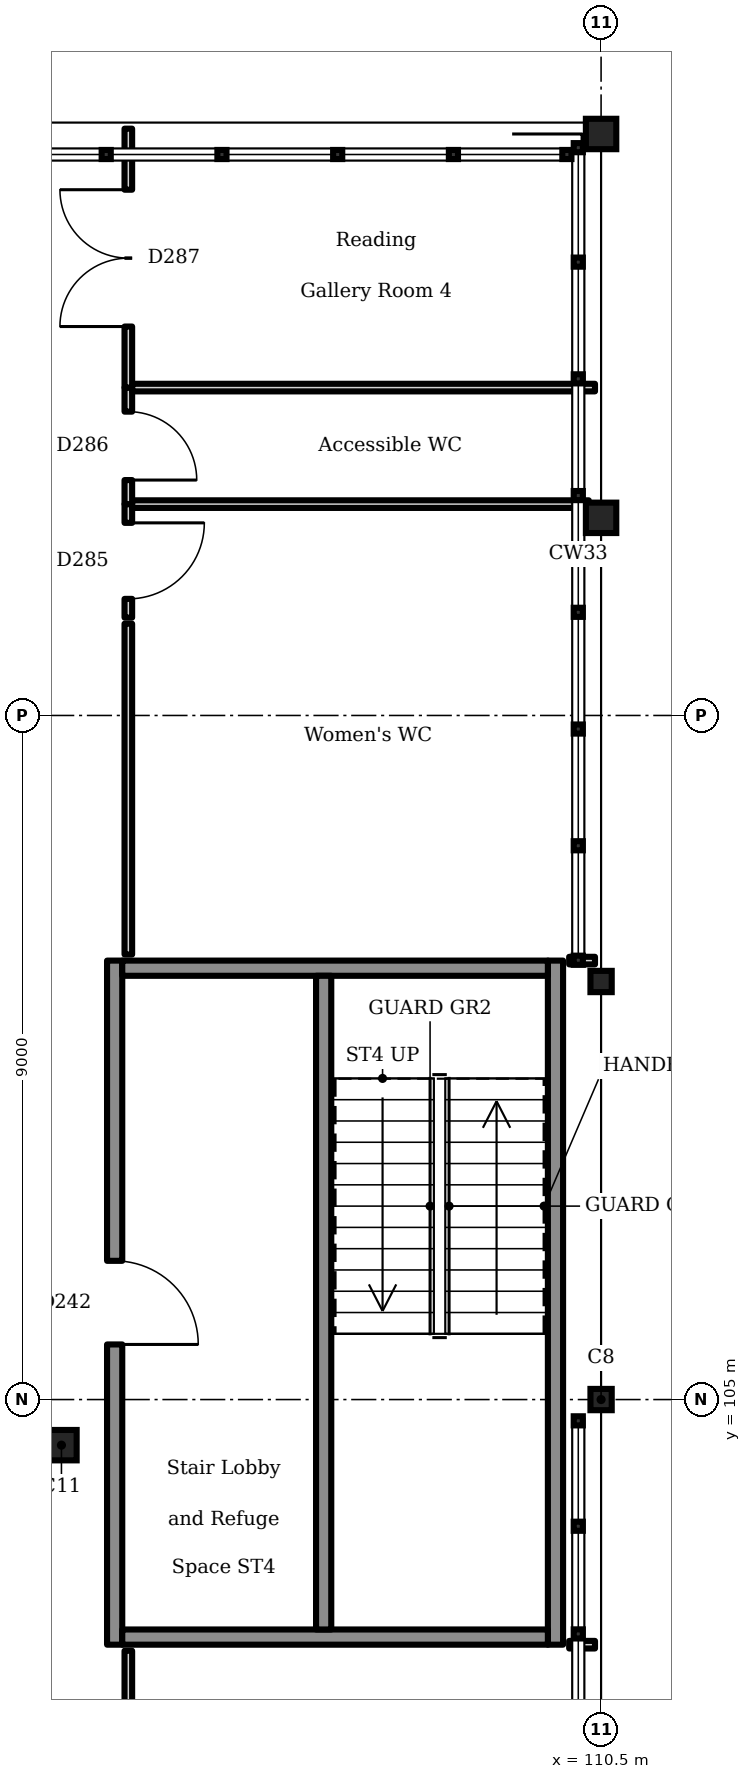
"""IFC4 building model, lengths in metres.
Left out: names, types, materials, properties, quantities, classifications, styles, units other than length and angle.
Written with IfcOpenShell. Run it as: python <this file> out.ifc"""

import sys

from ifc_helpers import new_model, si_unit, direction, frame, frame_2d, origin, origin_2d, place, context, subcontext, project, spatial, rectangle, hollow_circle, i_section, extrude, element, fill, save


model = new_model("IFC4")
c1 = context("Model", 3, precision=1e-05, world=origin(), true_north=direction((0.0, 1.0)))
c2 = subcontext(c1, "Body", "Model", "MODEL_VIEW")
j1 = project(units=[si_unit("LENGTHUNIT", "METRE"), si_unit("PLANEANGLEUNIT", "RADIAN")], contexts=[c1])
p1 = place(None, origin())
s1 = spatial("IfcSite", under=j1, at=p1, CompositionType="ELEMENT")
p2 = place(p1, origin())
s2 = spatial("IfcBuilding", under=s1, at=p2, CompositionType="ELEMENT")
p3 = place(p2, frame((0.0, 0.0, 18.9)))
s3 = spatial("IfcBuildingStorey", under=s2, at=p3, CompositionType="ELEMENT", Elevation=18.9)
for number, where, z_axis, x_axis in (
    (1, (110.5, 105.0, 0.0), (0.0, 0.0, 1.0), (1.0, 0.0, 0.0)),
    (2, (110.5, 110.5, 0.0), (0.0, 0.0, 1.0), (1.0, 0.0, 0.0)),
):
    element("IfcColumn", number, at=place(p3, frame(where, z_axis=z_axis, x_axis=x_axis)), inside=s3, PredefinedType="COLUMN", context=c2, shape_type="SweptSolid", body=[
        extrude(i_section(OverallWidth=0.28, OverallDepth=0.28, WebThickness=0.01, FlangeThickness=0.018, FilletRadius=0.024, at=origin_2d()), origin(), (0.0, 0.0, 1.0), 4.5),
    ])
p4 = place(p3, frame((103.4, 104.4, 0.0), z_axis=(0.0, 0.0, 1.0), x_axis=(1.0, 0.0, 0.0)))
e3 = element("IfcColumn", 3, at=p4, inside=s3, PredefinedType="COLUMN", context=c2, shape_type="SweptSolid", body=[
    extrude(hollow_circle(Radius=0.203, WallThickness=0.012, at=origin_2d()), origin(), (0.0, 0.0, 1.0), 4.5),
])
for number, where, z_axis, x_axis in (
    (4, (110.5, 121.65, 0.0), (0.0, 0.0, 1.0), (1.0, 0.0, 0.0)),
    (5, (110.5, 116.6, 0.0), (0.0, 0.0, 1.0), (1.0, 0.0, 0.0)),
):
    element("IfcColumn", number, at=place(p3, frame(where, z_axis=z_axis, x_axis=x_axis)), inside=s3, PredefinedType="COLUMN", context=c2, shape_type="SweptSolid", body=[
        extrude(hollow_circle(Radius=0.162, WallThickness=0.012, at=origin_2d()), origin(), (0.0, 0.0, 1.0), 4.5),
    ])
p5 = place(p3, frame((104.1, 101.775, 0.0), z_axis=(0.0, 0.0, 1.0), x_axis=(0.0, 1.0, 0.0)))
e6 = element("IfcWall", 6, at=p5, inside=s3, PredefinedType="SOLIDWALL", context=c2, shape_type="SweptSolid", body=[
    extrude(rectangle(XDim=9.0, YDim=0.2, at=frame_2d((4.5, 0.0))), origin(), (0.0, 0.0, 1.0), 4.35),
])
p6 = place(p5, frame((3.95, 0.0, 0.0)))
e7 = element("IfcOpeningElement", 7, at=p6, cuts=e6, PredefinedType="OPENING", context=c2, shape_type="SweptSolid", body=[
    extrude(rectangle(XDim=1.1, YDim=2.1, at=frame_2d((0.55, 1.05))), frame((0.0, 0.11, 0.0), z_axis=(0.0, -1.0, 0.0), x_axis=(1.0, 0.0, 0.0)), (0.0, 0.0, 1.0), 0.22),
])
p7 = place(p3, frame((109.9, 101.775, 0.0), z_axis=(0.0, 0.0, 1.0), x_axis=(0.0, 1.0, 0.0)))
e8 = element("IfcWall", 8, at=p7, inside=s3, PredefinedType="SOLIDWALL", context=c2, shape_type="SweptSolid", body=[
    extrude(rectangle(XDim=9.0, YDim=0.2, at=frame_2d((4.5, 0.0))), origin(), (0.0, 0.0, 1.0), 4.35),
])
for number, where, z_axis, x_axis in (
    (9, (104.2, 101.875, 0.0), (0.0, 0.0, 1.0), (1.0, 0.0, 0.0)),
    (10, (104.2, 110.675, 0.0), (0.0, 0.0, 1.0), (1.0, 0.0, 0.0)),
):
    element("IfcWall", number, at=place(p3, frame(where, z_axis=z_axis, x_axis=x_axis)), inside=s3, PredefinedType="SOLIDWALL", context=c2, shape_type="SweptSolid", body=[
        extrude(rectangle(XDim=5.6, YDim=0.2, at=frame_2d((2.8, 0.0))), origin(), (0.0, 0.0, 1.0), 4.35),
    ])
p8 = place(p3, frame((106.85, 101.975, 0.0), z_axis=(0.0, 0.0, 1.0), x_axis=(0.0, 1.0, 0.0)))
e11 = element("IfcWall", 11, at=p8, inside=s3, PredefinedType="SOLIDWALL", context=c2, shape_type="SweptSolid", body=[
    extrude(rectangle(XDim=8.6, YDim=0.2, at=frame_2d((4.3, 0.0))), origin(), (0.0, 0.0, 1.0), 4.35),
])
p9 = place(p3, frame((104.28, 96.08, 0.0), z_axis=(0.0, 0.0, 1.0), x_axis=(0.0, 1.0, 0.0)))
e12 = element("IfcWall", 12, at=p9, inside=s3, PredefinedType="PARTITIONING", context=c2, shape_type="SweptSolid", body=[
    extrude(rectangle(XDim=5.615, YDim=0.1, at=frame_2d((2.808, 0.0))), origin(), (0.0, 0.0, 1.0), 4.35),
])
p10 = place(p9, frame((1.907, 0.0, 0.0)))
e13 = element("IfcOpeningElement", 13, at=p10, cuts=e12, PredefinedType="OPENING", context=c2, shape_type="SweptSolid", body=[
    extrude(rectangle(XDim=1.8, YDim=2.1, at=frame_2d((0.9, 1.05))), frame((0.0, 0.06, 0.0), z_axis=(0.0, -1.0, 0.0), x_axis=(1.0, 0.0, 0.0)), (0.0, 0.0, 1.0), 0.12),
])
p11 = place(p3, frame((110.08, 101.775, 0.0), z_axis=(0.0, 0.0, 1.0), x_axis=(1.0, 0.0, 0.0)))
e14 = element("IfcWall", 14, at=p11, inside=s3, PredefinedType="PARTITIONING", context=c2, shape_type="SweptSolid", body=[
    extrude(rectangle(XDim=0.34, YDim=0.1, at=frame_2d((0.17, 0.0))), origin(), (0.0, 0.0, 1.0), 3.91),
])
p12 = place(p3, frame((110.42, 110.775, 0.0), z_axis=(0.0, 0.0, 1.0), x_axis=(-1.0, 0.0, 0.0)))
e15 = element("IfcWall", 15, at=p12, inside=s3, PredefinedType="PARTITIONING", context=c2, shape_type="SweptSolid", body=[
    extrude(rectangle(XDim=0.34, YDim=0.1, at=frame_2d((0.17, 0.0))), origin(), (0.0, 0.0, 1.0), 4.04),
])
p13 = place(p3, frame((104.28, 110.855, 0.0), z_axis=(0.0, 0.0, 1.0), x_axis=(0.0, 1.0, 0.0)))
e16 = element("IfcWall", 16, at=p13, inside=s3, PredefinedType="PARTITIONING", context=c2, shape_type="SweptSolid", body=[
    extrude(rectangle(XDim=4.352, YDim=0.1, at=frame_2d((2.176, 0.0))), origin(), (0.0, 0.0, 1.0), 4.35),
])
p14 = place(p3, frame((104.28, 115.287, 0.0), z_axis=(0.0, 0.0, 1.0), x_axis=(0.0, 1.0, 0.0)))
e17 = element("IfcWall", 17, at=p14, inside=s3, PredefinedType="PARTITIONING", context=c2, shape_type="SweptSolid", body=[
    extrude(rectangle(XDim=1.493, YDim=0.1, at=frame_2d((0.747, 0.0))), origin(), (0.0, 0.0, 1.0), 4.35),
])
p15 = place(p14, frame((0.247, 0.0, 0.0)))
e18 = element("IfcOpeningElement", 18, at=p15, cuts=e17, PredefinedType="OPENING", context=c2, shape_type="SweptSolid", body=[
    extrude(rectangle(XDim=1.0, YDim=2.1, at=frame_2d((0.5, 1.05))), frame((0.0, 0.06, 0.0), z_axis=(0.0, -1.0, 0.0), x_axis=(1.0, 0.0, 0.0)), (0.0, 0.0, 1.0), 0.12),
])
p16 = place(p3, frame((104.33, 116.781, 0.0), z_axis=(0.0, 0.0, 1.0), x_axis=(1.0, 0.0, 0.0)))
e19 = element("IfcWall", 19, at=p16, inside=s3, PredefinedType="PARTITIONING", context=c2, shape_type="SweptSolid", body=[
    extrude(rectangle(XDim=6.008, YDim=0.1, at=frame_2d((3.004, 0.0))), origin(), (0.0, 0.0, 1.0), 3.85),
])
p17 = place(p3, frame((104.28, 116.781, 0.0), z_axis=(0.0, 0.0, 1.0), x_axis=(0.0, 1.0, 0.0)))
e20 = element("IfcWall", 20, at=p17, inside=s3, PredefinedType="PARTITIONING", context=c2, shape_type="SweptSolid", body=[
    extrude(rectangle(XDim=1.533, YDim=0.1, at=frame_2d((0.767, 0.0))), origin(), (0.0, 0.0, 1.0), 4.35),
])
p18 = place(p17, frame((0.317, 0.0, 0.0)))
e21 = element("IfcOpeningElement", 21, at=p18, cuts=e20, PredefinedType="OPENING", context=c2, shape_type="SweptSolid", body=[
    extrude(rectangle(XDim=0.9, YDim=2.1, at=frame_2d((0.45, 1.05))), frame((0.0, 0.06, 0.0), z_axis=(0.0, -1.0, 0.0), x_axis=(1.0, 0.0, 0.0)), (0.0, 0.0, 1.0), 0.12),
])
p19 = place(p3, frame((104.33, 118.314, 0.0), z_axis=(0.0, 0.0, 1.0), x_axis=(1.0, 0.0, 0.0)))
e22 = element("IfcWall", 22, at=p19, inside=s3, PredefinedType="PARTITIONING", context=c2, shape_type="SweptSolid", body=[
    extrude(rectangle(XDim=6.09, YDim=0.1, at=frame_2d((3.045, 0.0))), origin(), (0.0, 0.0, 1.0), 3.85),
])
p20 = place(p3, frame((104.28, 118.314, 0.0), z_axis=(0.0, 0.0, 1.0), x_axis=(0.0, 1.0, 0.0)))
e23 = element("IfcWall", 23, at=p20, inside=s3, PredefinedType="PARTITIONING", context=c2, shape_type="SweptSolid", body=[
    extrude(rectangle(XDim=3.406, YDim=0.1, at=frame_2d((1.703, 0.0))), origin(), (0.0, 0.0, 1.0), 3.95),
])
p21 = place(p20, frame((0.803, 0.0, 0.0)))
e24 = element("IfcOpeningElement", 24, at=p21, cuts=e23, PredefinedType="OPENING", context=c2, shape_type="SweptSolid", body=[
    extrude(rectangle(XDim=1.8, YDim=2.1, at=frame_2d((0.9, 1.05))), frame((0.0, 0.06, 0.0), z_axis=(0.0, -1.0, 0.0), x_axis=(1.0, 0.0, 0.0)), (0.0, 0.0, 1.0), 0.12),
])
p22 = place(p6, frame((1.1, 0.0, 0.0), z_axis=(0.0, 0.0, 1.0), x_axis=(-1.0, 0.0, 0.0)))
e25 = element("IfcDoor", 25, at=p22, inside=s3, OperationType="SINGLE_SWING_LEFT", PredefinedType="DOOR", context=c2, shape_type="SweptSolid", body=[
    extrude(rectangle(XDim=1.1, YDim=2.1, at=frame_2d((0.55, 1.05))), frame((0.0, 0.025, 0.0), z_axis=(0.0, -1.0, 0.0), x_axis=(1.0, 0.0, 0.0)), (0.0, 0.0, 1.0), 0.05),
])
fill(e7, e25)
p23 = place(p15, frame((1.0, 0.0, 0.0), z_axis=(0.0, 0.0, 1.0), x_axis=(-1.0, 0.0, 0.0)))
e26 = element("IfcDoor", 26, at=p23, inside=s3, OperationType="SINGLE_SWING_RIGHT", PredefinedType="DOOR", context=c2, shape_type="SweptSolid", body=[
    extrude(rectangle(XDim=1.0, YDim=2.1, at=frame_2d((0.5, 1.05))), frame((0.0, 0.025, 0.0), z_axis=(0.0, -1.0, 0.0), x_axis=(1.0, 0.0, 0.0)), (0.0, 0.0, 1.0), 0.05),
])
fill(e18, e26)
p24 = place(p18, frame((0.9, 0.0, 0.0), z_axis=(0.0, 0.0, 1.0), x_axis=(-1.0, 0.0, 0.0)))
e27 = element("IfcDoor", 27, at=p24, inside=s3, OperationType="SINGLE_SWING_LEFT", PredefinedType="DOOR", context=c2, shape_type="SweptSolid", body=[
    extrude(rectangle(XDim=0.9, YDim=2.1, at=frame_2d((0.45, 1.05))), frame((0.0, 0.025, 0.0), z_axis=(0.0, -1.0, 0.0), x_axis=(1.0, 0.0, 0.0)), (0.0, 0.0, 1.0), 0.05),
])
fill(e21, e27)
p25 = place(p21, origin())
e28 = element("IfcDoor", 28, at=p25, inside=s3, OperationType="DOUBLE_DOOR_SINGLE_SWING", PredefinedType="DOOR", context=c2, shape_type="SweptSolid", body=[
    extrude(rectangle(XDim=1.8, YDim=2.1, at=frame_2d((0.9, 1.05))), frame((0.0, 0.025, 0.0), z_axis=(0.0, -1.0, 0.0), x_axis=(1.0, 0.0, 0.0)), (0.0, 0.0, 1.0), 0.05),
])
fill(e24, e28)
save(model, sys.argv[1])
